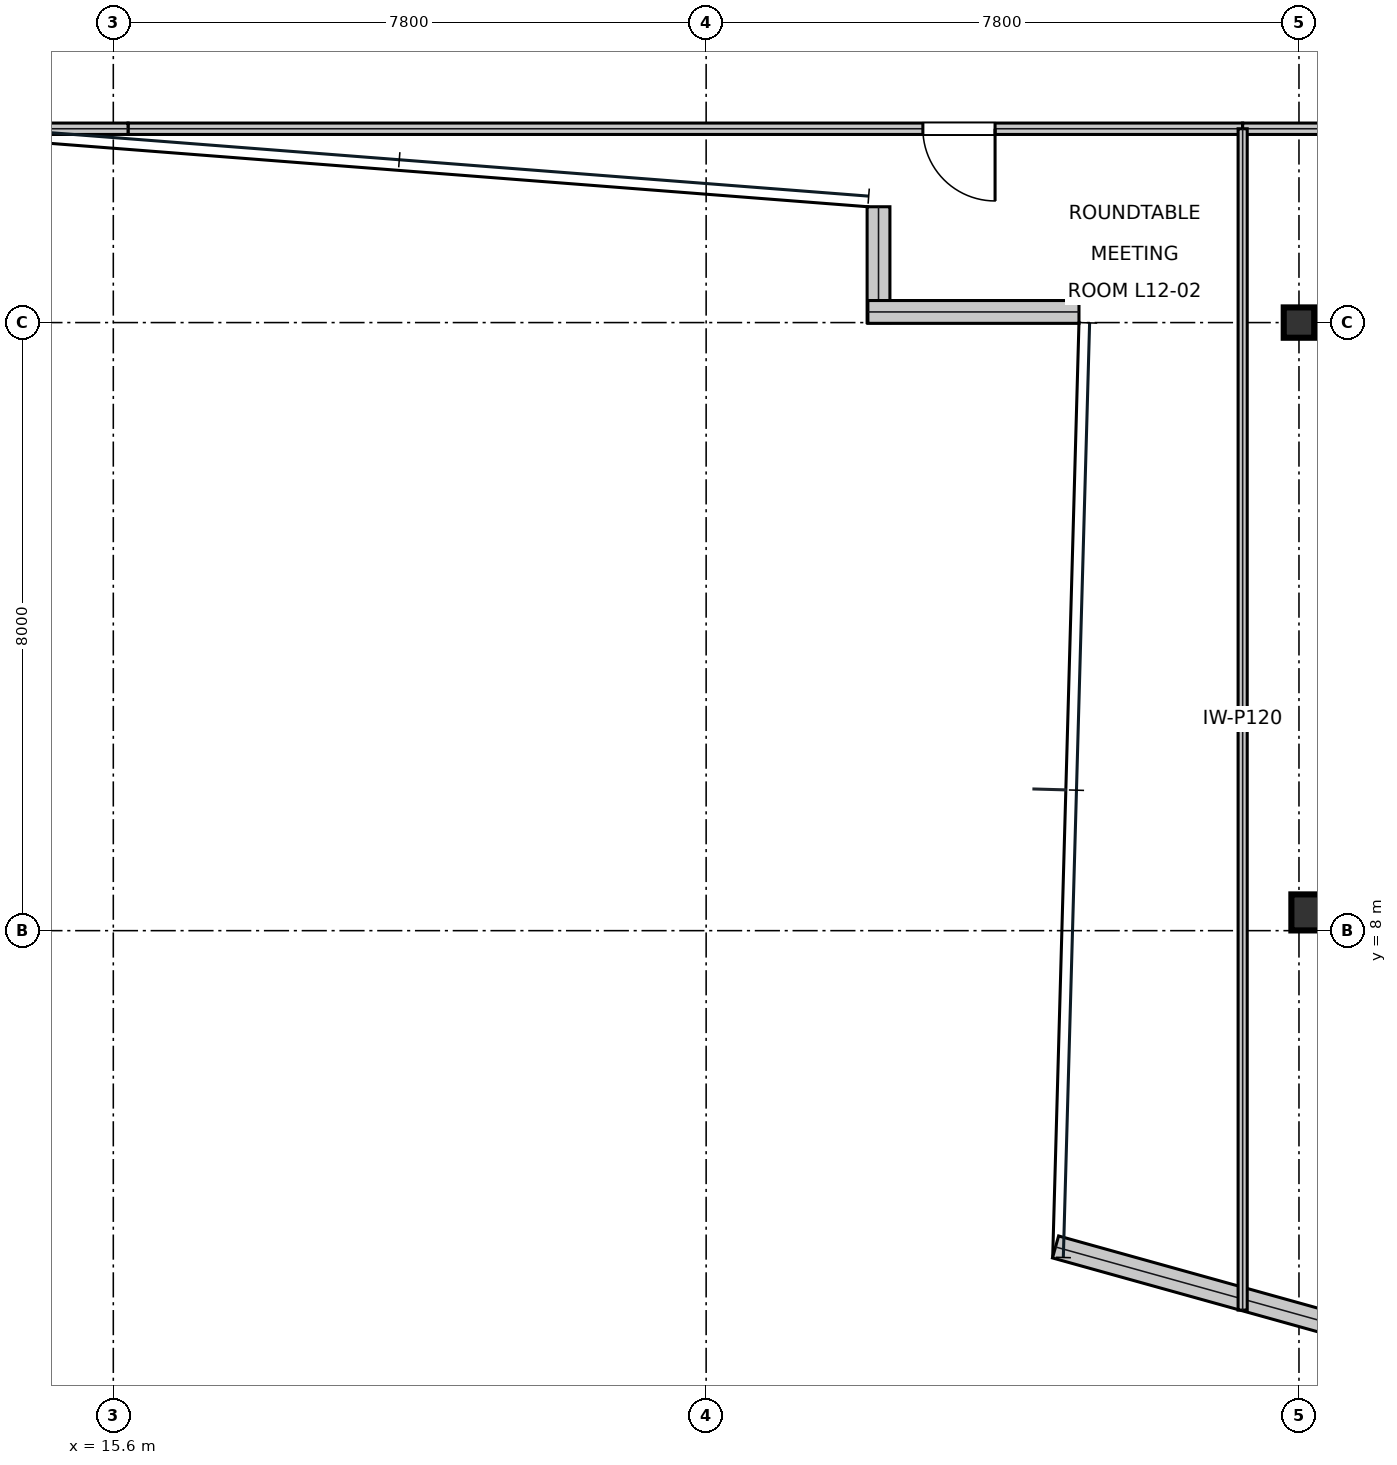
"""IFC4 building model, lengths in metres.
Left out: names, types, materials, properties, quantities, classifications, styles, units other than length and angle.
Written with IfcOpenShell. Run it as: python <this file> out.ifc"""

import sys

from ifc_helpers import new_model, si_unit, direction, frame, frame_2d, origin, origin_2d, place, context, subcontext, project, spatial, rectangle, i_section, extrude, element, fill, save


model = new_model("IFC4")
c1 = context("Model", 3, precision=1e-05, world=origin(), true_north=direction((0.0, 1.0)))
c2 = subcontext(c1, "Body", "Model", "MODEL_VIEW")
j1 = project(units=[si_unit("LENGTHUNIT", "METRE"), si_unit("PLANEANGLEUNIT", "RADIAN")], contexts=[c1])
p1 = place(None, origin())
s1 = spatial("IfcSite", under=j1, at=p1, CompositionType="ELEMENT")
p2 = place(p1, origin())
s2 = spatial("IfcBuilding", under=s1, at=p2, CompositionType="ELEMENT")
p3 = place(p2, frame((0.0, 0.0, 58.05)))
s3 = spatial("IfcBuildingStorey", under=s2, at=p3, CompositionType="ELEMENT", Elevation=58.05)
p4 = place(p3, frame((31.2, 16.0, 0.0), z_axis=(0.0, 0.0, 1.0), x_axis=(1.0, 0.0, 0.0)))
e1 = element("IfcColumn", 1, at=p4, inside=s3, PredefinedType="COLUMN", context=c2, shape_type="SweptSolid", body=[
    extrude(i_section(OverallWidth=0.401, OverallDepth=0.399, WebThickness=0.025, FlangeThickness=0.04, at=origin_2d()), origin(), (0.0, 0.0, 1.0), 4.044),
])
p5 = place(p3, frame((31.312, 8.24, 0.016), z_axis=(0.017423559696, 0.03727549008, 0.999153120101), x_axis=(-0.905919107853, 0.423450788199, 0.0)))
e2 = element("IfcColumn", 2, at=p5, inside=s3, PredefinedType="COLUMN", context=c2, shape_type="SweptSolid", body=[
    extrude(i_section(OverallWidth=0.424, OverallDepth=0.474, WebThickness=0.048, FlangeThickness=0.077, at=origin_2d()), origin(), (0.0, 0.0, 1.0), 4.021),
])
p6 = place(p3, frame((25.668, 17.524, 0.0), z_axis=(0.0, 0.0, 1.0), x_axis=(0.0, -1.0, 0.0)))
e3 = element("IfcWall", 3, at=p6, inside=s3, PredefinedType="STANDARD", context=c2, shape_type="SweptSolid", body=[
    extrude(rectangle(XDim=1.524, YDim=0.3, at=frame_2d((0.762, 0.0))), origin(), (0.0, 0.0, 1.0), 3.338),
])
p7 = place(p3, frame((25.528, 16.14, 0.0), z_axis=(0.0, 0.0, 1.0), x_axis=(1.0, 0.0, 0.0)))
e4 = element("IfcWall", 4, at=p7, inside=s3, PredefinedType="STANDARD", context=c2, shape_type="SweptSolid", body=[
    extrude(rectangle(XDim=2.777, YDim=0.3, at=frame_2d((1.389, 0.0))), origin(), (0.0, 0.0, 1.0), 3.81),
])
p8 = place(p3, frame((27.997, 3.839, 0.0), z_axis=(0.0, 0.0, 1.0), x_axis=(0.963365312104, -0.268192608836, 0.0)))
e5 = element("IfcWall", 5, at=p8, inside=s3, PredefinedType="STANDARD", context=c2, shape_type="SweptSolid", body=[
    extrude(rectangle(XDim=7.159, YDim=0.3, at=frame_2d((3.579, 0.0))), origin(), (0.0, 0.0, 1.0), 3.81),
])
p9 = place(p3, frame((15.794, 18.55, 0.0), z_axis=(0.0, 0.0, 1.0), x_axis=(1.0, 0.0, 0.0)))
e6 = element("IfcWall", 6, at=p9, inside=s3, PredefinedType="PARTITIONING", context=c2, shape_type="SweptSolid", body=[
    extrude(rectangle(XDim=14.665, YDim=0.15, at=frame_2d((7.333, 0.0))), origin(), (0.0, 0.0, 1.0), 3.338),
])
p10 = place(p9, frame((10.458, 0.0, 0.0)))
e7 = element("IfcOpeningElement", 7, at=p10, cuts=e6, PredefinedType="OPENING", context=c2, shape_type="SweptSolid", body=[
    extrude(rectangle(XDim=0.95, YDim=2.15, at=frame_2d((0.475, 1.075))), frame((0.0, 0.085, 0.0), z_axis=(0.0, -1.0, 0.0), x_axis=(1.0, 0.0, 0.0)), (0.0, 0.0, 1.0), 0.17),
])
p11 = place(p3, frame((30.459, 18.55, 0.0), z_axis=(0.0, 0.0, 1.0), x_axis=(1.0, 0.0, 0.0)))
e8 = element("IfcWall", 8, at=p11, inside=s3, PredefinedType="PARTITIONING", context=c2, shape_type="SweptSolid", body=[
    extrude(rectangle(XDim=2.941, YDim=0.15, at=frame_2d((1.47, 0.0))), origin(), (0.0, 0.0, 1.0), 3.181),
])
p12 = place(p3, frame((14.0, 18.55, 0.0), z_axis=(0.0, 0.0, 1.0), x_axis=(1.0, 0.0, 0.0)))
e9 = element("IfcWall", 9, at=p12, inside=s3, PredefinedType="PARTITIONING", context=c2, shape_type="SweptSolid", body=[
    extrude(rectangle(XDim=1.794, YDim=0.15, at=frame_2d((0.897, 0.0))), origin(), (0.0, 0.0, 1.0), 3.81),
])
p13 = place(p3, frame((30.459, 3.008, 0.0), z_axis=(0.0, 0.0, 1.0), x_axis=(0.0, 1.0, 0.0)))
e10 = element("IfcWall", 10, at=p13, inside=s3, PredefinedType="PARTITIONING", context=c2, shape_type="SweptSolid", body=[
    extrude(rectangle(XDim=15.542, YDim=0.12, at=frame_2d((7.771, 0.0))), origin(), (0.0, 0.0, 1.0), 3.338),
])
p14 = place(p10, frame((0.95, 0.0, 0.0), z_axis=(0.0, 0.0, 1.0), x_axis=(-1.0, 0.0, 0.0)))
e11 = element("IfcDoor", 11, at=p14, inside=s3, OperationType="SINGLE_SWING_LEFT", PredefinedType="DOOR", context=c2, shape_type="SweptSolid", body=[
    extrude(rectangle(XDim=0.95, YDim=2.15, at=frame_2d((0.475, 1.075))), frame((0.0, 0.025, 0.0), z_axis=(0.0, -1.0, 0.0), x_axis=(1.0, 0.0, 0.0)), (0.0, 0.0, 1.0), 0.05),
])
fill(e7, e11)
save(model, sys.argv[1])
